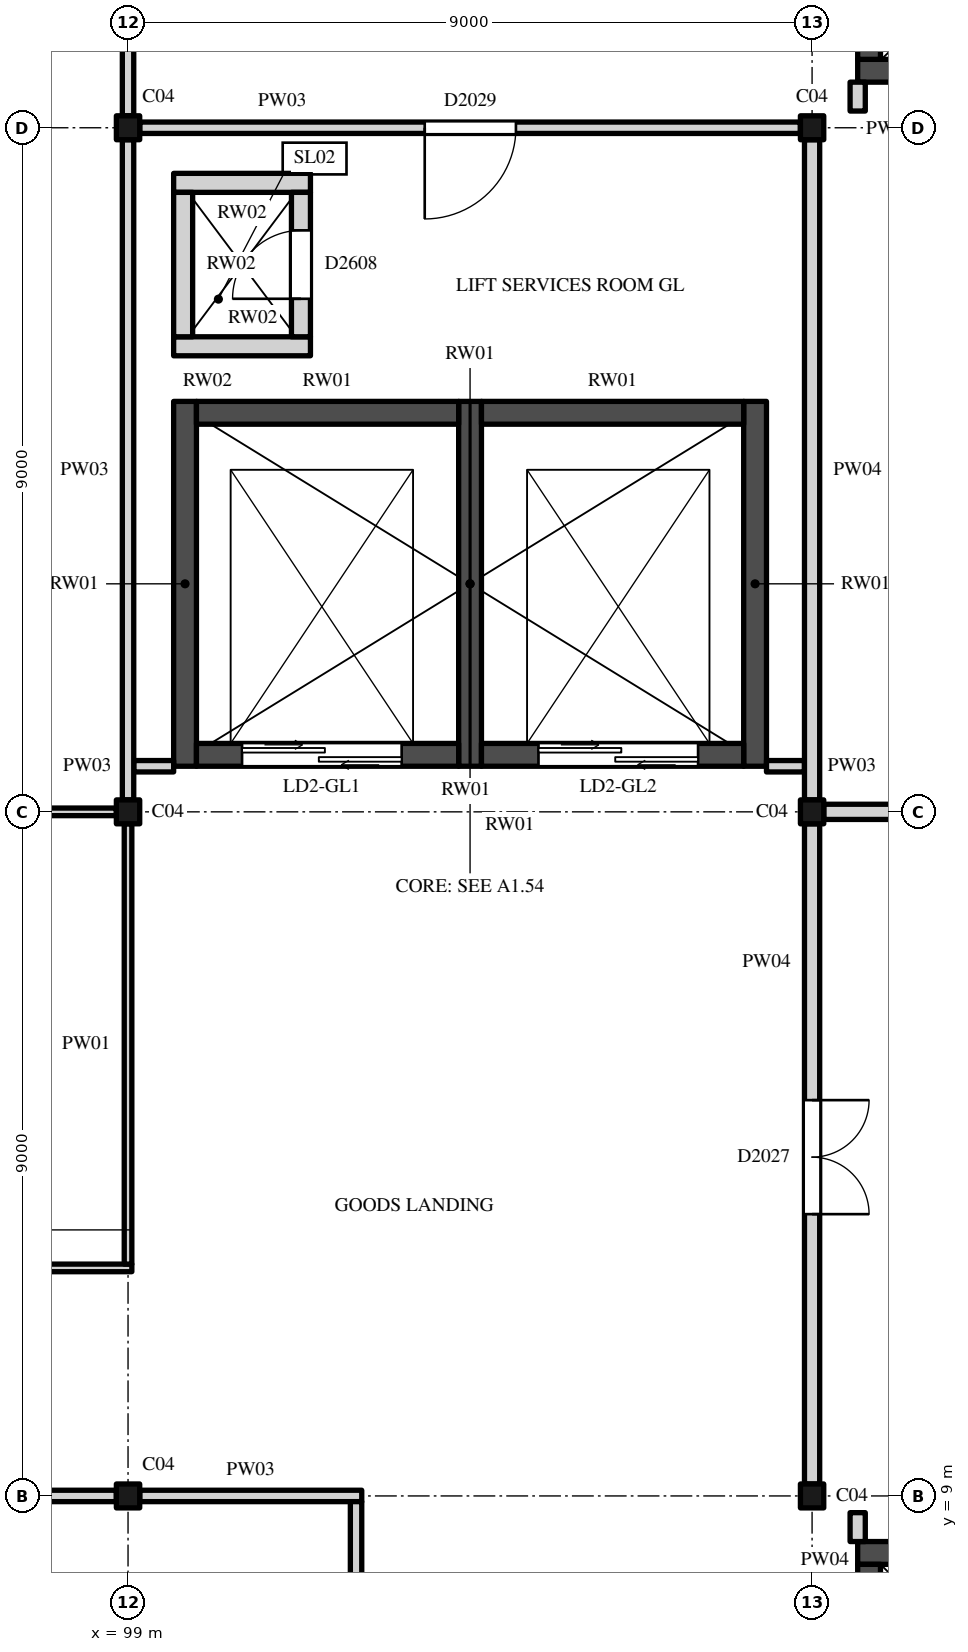
"""IFC4 building model, lengths in metres.
Left out: names, types, materials, properties, quantities, classifications, styles, units other than length and angle.
Written with IfcOpenShell. Run it as: python <this file> out.ifc"""

import sys

from ifc_helpers import new_model, si_unit, direction, frame, frame_2d, origin, origin_2d, place, context, subcontext, project, spatial, rectangle, i_section, extrude, element, fill, save


model = new_model("IFC4")
c1 = context("Model", 3, precision=1e-05, world=origin(), true_north=direction((0.0, 1.0)))
c2 = subcontext(c1, "Body", "Model", "MODEL_VIEW")
j1 = project(units=[si_unit("LENGTHUNIT", "METRE"), si_unit("PLANEANGLEUNIT", "RADIAN")], contexts=[c1])
p1 = place(None, origin())
s1 = spatial("IfcSite", under=j1, at=p1, CompositionType="ELEMENT")
p2 = place(p1, origin())
s2 = spatial("IfcBuilding", under=s1, at=p2, CompositionType="ELEMENT")
p3 = place(p2, frame((0.0, 0.0, 11.0)))
s3 = spatial("IfcBuildingStorey", under=s2, at=p3, CompositionType="ELEMENT", Elevation=11.0)
for number, where, z_axis, x_axis in (
    (1, (99.0, 9.0, 0.0), (0.0, 0.0, 1.0), (1.0, 0.0, 0.0)),
    (2, (108.0, 9.0, 0.0), (0.0, 0.0, 1.0), (1.0, 0.0, 0.0)),
    (3, (99.0, 18.0, 0.0), (0.0, 0.0, 1.0), (1.0, 0.0, 0.0)),
    (4, (108.0, 18.0, 0.0), (0.0, 0.0, 1.0), (1.0, 0.0, 0.0)),
    (5, (99.0, 27.0, 0.0), (0.0, 0.0, 1.0), (1.0, 0.0, 0.0)),
    (6, (108.0, 27.0, 0.0), (0.0, 0.0, 1.0), (1.0, 0.0, 0.0)),
):
    element("IfcColumn", number, at=place(p3, frame(where, z_axis=z_axis, x_axis=x_axis)), inside=s3, PredefinedType="COLUMN", context=c2, shape_type="SweptSolid", body=[
        extrude(i_section(OverallWidth=0.307, OverallDepth=0.315, WebThickness=0.012, FlangeThickness=0.019, FilletRadius=0.017, at=origin_2d()), origin(), (0.0, 0.0, 1.0), 5.0),
    ])
p4 = place(p3, frame((108.6, 8.25, 0.0), z_axis=(0.0, 0.0, 1.0), x_axis=(1.0, 0.0, 0.0)))
e7 = element("IfcWall", 7, at=p4, inside=s3, PredefinedType="SHEAR", context=c2, shape_type="SweptSolid", body=[
    extrude(rectangle(XDim=8.1, YDim=0.3, at=frame_2d((4.05, 0.0))), origin(), (0.0, 0.0, 1.0), 4.825),
])
p5 = place(p3, frame((108.75, 0.3, 0.0), z_axis=(0.0, 0.0, 1.0), x_axis=(0.0, 1.0, 0.0)))
e8 = element("IfcWall", 8, at=p5, inside=s3, PredefinedType="SHEAR", context=c2, shape_type="SweptSolid", body=[
    extrude(rectangle(XDim=7.8, YDim=0.3, at=frame_2d((3.9, 0.0))), origin(), (0.0, 0.0, 1.0), 4.825),
])
p6 = place(p5, frame((3.6, 0.0, 0.0)))
e9 = element("IfcOpeningElement", 9, at=p6, cuts=e8, PredefinedType="OPENING", context=c2, shape_type="SweptSolid", body=[
    extrude(rectangle(XDim=1.2, YDim=2.1, at=frame_2d((0.6, 1.05))), frame((0.0, 0.16, 0.0), z_axis=(0.0, -1.0, 0.0), x_axis=(1.0, 0.0, 0.0)), (0.0, 0.0, 1.0), 0.32),
])
p7 = place(p3, frame((108.6, 27.75, 0.0), z_axis=(0.0, 0.0, 1.0), x_axis=(1.0, 0.0, 0.0)))
e10 = element("IfcWall", 10, at=p7, inside=s3, PredefinedType="SHEAR", context=c2, shape_type="SweptSolid", body=[
    extrude(rectangle(XDim=8.1, YDim=0.3, at=frame_2d((4.05, 0.0))), origin(), (0.0, 0.0, 1.0), 4.825),
])
p8 = place(p3, frame((108.75, 27.9, 0.0), z_axis=(0.0, 0.0, 1.0), x_axis=(0.0, 1.0, 0.0)))
e11 = element("IfcWall", 11, at=p8, inside=s3, PredefinedType="SHEAR", context=c2, shape_type="SweptSolid", body=[
    extrude(rectangle(XDim=7.2, YDim=0.3, at=frame_2d((3.6, 0.0))), origin(), (0.0, 0.0, 1.0), 4.825),
])
p9 = place(p8, frame((3.0, 0.0, 0.0)))
e12 = element("IfcOpeningElement", 12, at=p9, cuts=e11, PredefinedType="OPENING", context=c2, shape_type="SweptSolid", body=[
    extrude(rectangle(XDim=1.2, YDim=2.1, at=frame_2d((0.6, 1.05))), frame((0.0, 0.16, 0.0), z_axis=(0.0, -1.0, 0.0), x_axis=(1.0, 0.0, 0.0)), (0.0, 0.0, 1.0), 0.32),
])
for number, where, z_axis, x_axis in (
    (13, (99.75, 18.6, 0.0), (0.0, 0.0, 1.0), (0.0, 1.0, 0.0)),
    (14, (103.5, 18.6, 0.0), (0.0, 0.0, 1.0), (0.0, 1.0, 0.0)),
    (15, (107.25, 18.6, 0.0), (0.0, 0.0, 1.0), (0.0, 1.0, 0.0)),
):
    element("IfcWall", number, at=place(p3, frame(where, z_axis=z_axis, x_axis=x_axis)), inside=s3, PredefinedType="SHEAR", context=c2, shape_type="SweptSolid", body=[
        extrude(rectangle(XDim=4.8, YDim=0.3, at=frame_2d((2.4, 0.0))), origin(), (0.0, 0.0, 1.0), 4.825),
    ])
p10 = place(p3, frame((99.9, 18.75, 0.0), z_axis=(0.0, 0.0, 1.0), x_axis=(1.0, 0.0, 0.0)))
e16 = element("IfcWall", 16, at=p10, inside=s3, PredefinedType="SHEAR", context=c2, shape_type="SweptSolid", body=[
    extrude(rectangle(XDim=3.45, YDim=0.3, at=frame_2d((1.725, 0.0))), origin(), (0.0, 0.0, 1.0), 4.825),
])
p11 = place(p10, frame((0.6, 0.0, 0.0)))
e17 = element("IfcOpeningElement", 17, at=p11, cuts=e16, PredefinedType="OPENING", context=c2, shape_type="SweptSolid", body=[
    extrude(rectangle(XDim=2.1, YDim=2.4, at=frame_2d((1.05, 1.2))), frame((0.0, 0.16, 0.0), z_axis=(0.0, -1.0, 0.0), x_axis=(1.0, 0.0, 0.0)), (0.0, 0.0, 1.0), 0.32),
])
p12 = place(p3, frame((99.9, 23.25, 0.0), z_axis=(0.0, 0.0, 1.0), x_axis=(1.0, 0.0, 0.0)))
e18 = element("IfcWall", 18, at=p12, inside=s3, PredefinedType="SHEAR", context=c2, shape_type="SweptSolid", body=[
    extrude(rectangle(XDim=3.45, YDim=0.3, at=frame_2d((1.725, 0.0))), origin(), (0.0, 0.0, 1.0), 4.825),
])
p13 = place(p3, frame((103.65, 18.75, 0.0), z_axis=(0.0, 0.0, 1.0), x_axis=(1.0, 0.0, 0.0)))
e19 = element("IfcWall", 19, at=p13, inside=s3, PredefinedType="SHEAR", context=c2, shape_type="SweptSolid", body=[
    extrude(rectangle(XDim=3.45, YDim=0.3, at=frame_2d((1.725, 0.0))), origin(), (0.0, 0.0, 1.0), 4.825),
])
p14 = place(p13, frame((0.75, 0.0, 0.0)))
e20 = element("IfcOpeningElement", 20, at=p14, cuts=e19, PredefinedType="OPENING", context=c2, shape_type="SweptSolid", body=[
    extrude(rectangle(XDim=2.1, YDim=2.4, at=frame_2d((1.05, 1.2))), frame((0.0, 0.16, 0.0), z_axis=(0.0, -1.0, 0.0), x_axis=(1.0, 0.0, 0.0)), (0.0, 0.0, 1.0), 0.32),
])
p15 = place(p3, frame((103.65, 23.25, 0.0), z_axis=(0.0, 0.0, 1.0), x_axis=(1.0, 0.0, 0.0)))
e21 = element("IfcWall", 21, at=p15, inside=s3, PredefinedType="SHEAR", context=c2, shape_type="SweptSolid", body=[
    extrude(rectangle(XDim=3.45, YDim=0.3, at=frame_2d((1.725, 0.0))), origin(), (0.0, 0.0, 1.0), 4.825),
])
for number, where, z_axis, x_axis in (
    (22, (99.6, 24.125, 0.0), (0.0, 0.0, 1.0), (1.0, 0.0, 0.0)),
    (23, (99.6, 26.275, 0.0), (0.0, 0.0, 1.0), (1.0, 0.0, 0.0)),
):
    element("IfcWall", number, at=place(p3, frame(where, z_axis=z_axis, x_axis=x_axis)), inside=s3, PredefinedType="STANDARD", context=c2, shape_type="SweptSolid", body=[
        extrude(rectangle(XDim=1.8, YDim=0.25, at=frame_2d((0.9, 0.0))), origin(), (0.0, 0.0, 1.0), 4.825),
    ])
p16 = place(p3, frame((99.725, 24.25, 0.0), z_axis=(0.0, 0.0, 1.0), x_axis=(0.0, 1.0, 0.0)))
e24 = element("IfcWall", 24, at=p16, inside=s3, PredefinedType="STANDARD", context=c2, shape_type="SweptSolid", body=[
    extrude(rectangle(XDim=1.9, YDim=0.25, at=frame_2d((0.95, 0.0))), origin(), (0.0, 0.0, 1.0), 4.825),
])
p17 = place(p3, frame((101.275, 24.25, 0.0), z_axis=(0.0, 0.0, 1.0), x_axis=(0.0, 1.0, 0.0)))
e25 = element("IfcWall", 25, at=p17, inside=s3, PredefinedType="STANDARD", context=c2, shape_type="SweptSolid", body=[
    extrude(rectangle(XDim=1.9, YDim=0.25, at=frame_2d((0.95, 0.0))), origin(), (0.0, 0.0, 1.0), 4.825),
])
p18 = place(p17, frame((0.5, 0.0, 0.0)))
e26 = element("IfcOpeningElement", 26, at=p18, cuts=e25, PredefinedType="OPENING", context=c2, shape_type="SweptSolid", body=[
    extrude(rectangle(XDim=0.9, YDim=2.1, at=frame_2d((0.45, 1.05))), frame((0.0, 0.135, 0.0), z_axis=(0.0, -1.0, 0.0), x_axis=(1.0, 0.0, 0.0)), (0.0, 0.0, 1.0), 0.27),
])
for number, where, z_axis, x_axis in (
    (27, (100.5, 11.325, 5.0), (0.0, 0.0, 1.0), (1.0, 0.0, 0.0)),
    (28, (100.5, 15.675, 5.0), (0.0, 0.0, 1.0), (1.0, 0.0, 0.0)),
):
    element("IfcWall", number, at=place(p3, frame(where, z_axis=z_axis, x_axis=x_axis)), inside=s3, PredefinedType="PARAPET", context=c2, shape_type="SweptSolid", body=[
        extrude(rectangle(XDim=6.0, YDim=0.15, at=frame_2d((3.0, 0.0))), origin(), (0.0, 0.0, 1.0), 0.5),
    ])
for number, where, z_axis, x_axis in (
    (29, (100.575, 11.4, 5.0), (0.0, 0.0, 1.0), (0.0, 1.0, 0.0)),
    (30, (106.425, 11.4, 5.0), (0.0, 0.0, 1.0), (0.0, 1.0, 0.0)),
):
    element("IfcWall", number, at=place(p3, frame(where, z_axis=z_axis, x_axis=x_axis)), inside=s3, PredefinedType="PARAPET", context=c2, shape_type="SweptSolid", body=[
        extrude(rectangle(XDim=4.2, YDim=0.15, at=frame_2d((2.1, 0.0))), origin(), (0.0, 0.0, 1.0), 0.5),
    ])
for number, where, z_axis, x_axis in (
    (31, (100.5, 20.325, 5.0), (0.0, 0.0, 1.0), (1.0, 0.0, 0.0)),
    (32, (100.5, 24.675, 5.0), (0.0, 0.0, 1.0), (1.0, 0.0, 0.0)),
):
    element("IfcWall", number, at=place(p3, frame(where, z_axis=z_axis, x_axis=x_axis)), inside=s3, PredefinedType="PARAPET", context=c2, shape_type="SweptSolid", body=[
        extrude(rectangle(XDim=6.0, YDim=0.15, at=frame_2d((3.0, 0.0))), origin(), (0.0, 0.0, 1.0), 0.5),
    ])
for number, where, z_axis, x_axis in (
    (33, (100.575, 20.4, 5.0), (0.0, 0.0, 1.0), (0.0, 1.0, 0.0)),
    (34, (106.425, 20.4, 5.0), (0.0, 0.0, 1.0), (0.0, 1.0, 0.0)),
):
    element("IfcWall", number, at=place(p3, frame(where, z_axis=z_axis, x_axis=x_axis)), inside=s3, PredefinedType="PARAPET", context=c2, shape_type="SweptSolid", body=[
        extrude(rectangle(XDim=4.2, YDim=0.15, at=frame_2d((2.1, 0.0))), origin(), (0.0, 0.0, 1.0), 0.5),
    ])
p19 = place(p3, frame((90.154, 9.0, 0.0), z_axis=(0.0, 0.0, 1.0), x_axis=(1.0, 0.0, 0.0)))
e35 = element("IfcWall", 35, at=p19, inside=s3, PredefinedType="PARTITIONING", context=c2, shape_type="SweptSolid", body=[
    extrude(rectangle(XDim=8.693, YDim=0.15, at=frame_2d((4.346, 0.0))), origin(), (0.0, 0.0, 1.0), 4.419),
])
p20 = place(p3, frame((99.154, 9.0, 0.0), z_axis=(0.0, 0.0, 1.0), x_axis=(1.0, 0.0, 0.0)))
e36 = element("IfcWall", 36, at=p20, inside=s3, PredefinedType="PARTITIONING", context=c2, shape_type="SweptSolid", body=[
    extrude(rectangle(XDim=2.921, YDim=0.15, at=frame_2d((1.461, 0.0))), origin(), (0.0, 0.0, 1.0), 4.419),
])
p21 = place(p3, frame((63.1, 12.0, 0.0), z_axis=(0.0, 0.0, 1.0), x_axis=(1.0, 0.0, 0.0)))
e37 = element("IfcWall", 37, at=p21, inside=s3, PredefinedType="PARTITIONING", context=c2, shape_type="SweptSolid", body=[
    extrude(rectangle(XDim=35.95, YDim=0.1, at=frame_2d((17.975, 0.0))), origin(), (0.0, 0.0, 1.0), 4.422),
])
p22 = place(p21, frame((12.75, 0.0, 0.0)))
e38 = element("IfcOpeningElement", 38, at=p22, cuts=e37, PredefinedType="OPENING", context=c2, shape_type="SweptSolid", body=[
    extrude(rectangle(XDim=1.35, YDim=2.4, at=frame_2d((0.675, 1.2))), frame((0.0, 0.06, 0.0), z_axis=(0.0, -1.0, 0.0), x_axis=(1.0, 0.0, 0.0)), (0.0, 0.0, 1.0), 0.12),
])
p23 = place(p21, frame((30.75, 0.0, 0.0)))
e39 = element("IfcOpeningElement", 39, at=p23, cuts=e37, PredefinedType="OPENING", context=c2, shape_type="SweptSolid", body=[
    extrude(rectangle(XDim=1.35, YDim=2.4, at=frame_2d((0.675, 1.2))), frame((0.0, 0.06, 0.0), z_axis=(0.0, -1.0, 0.0), x_axis=(1.0, 0.0, 0.0)), (0.0, 0.0, 1.0), 0.12),
])
p24 = place(p3, frame((90.154, 18.0, 0.0), z_axis=(0.0, 0.0, 1.0), x_axis=(1.0, 0.0, 0.0)))
e40 = element("IfcWall", 40, at=p24, inside=s3, PredefinedType="PARTITIONING", context=c2, shape_type="SweptSolid", body=[
    extrude(rectangle(XDim=8.693, YDim=0.1, at=frame_2d((4.346, 0.0))), origin(), (0.0, 0.0, 1.0), 4.419),
])
p25 = place(p3, frame((108.154, 18.0, 0.0), z_axis=(0.0, 0.0, 1.0), x_axis=(1.0, 0.0, 0.0)))
e41 = element("IfcWall", 41, at=p25, inside=s3, PredefinedType="PARTITIONING", context=c2, shape_type="SweptSolid", body=[
    extrude(rectangle(XDim=8.546, YDim=0.2, at=frame_2d((4.273, 0.0))), origin(), (0.0, 0.0, 1.0), 4.419),
])
p26 = place(p25, frame((3.55, 0.0, 0.0)))
e42 = element("IfcOpeningElement", 42, at=p26, cuts=e41, PredefinedType="OPENING", context=c2, shape_type="SweptSolid", body=[
    extrude(rectangle(XDim=1.5, YDim=2.4, at=frame_2d((0.75, 1.2))), frame((0.0, 0.11, 0.0), z_axis=(0.0, -1.0, 0.0), x_axis=(1.0, 0.0, 0.0)), (0.0, 0.0, 1.0), 0.22),
])
p27 = place(p3, frame((99.075, 18.6, 0.0), z_axis=(0.0, 0.0, 1.0), x_axis=(1.0, 0.0, 0.0)))
e43 = element("IfcWall", 43, at=p27, inside=s3, PredefinedType="PARTITIONING", context=c2, shape_type="SweptSolid", body=[
    extrude(rectangle(XDim=0.525, YDim=0.15, at=frame_2d((0.263, 0.0))), origin(), (0.0, 0.0, 1.0), 4.825),
])
p28 = place(p3, frame((107.4, 18.6, 0.0), z_axis=(0.0, 0.0, 1.0), x_axis=(1.0, 0.0, 0.0)))
e44 = element("IfcWall", 44, at=p28, inside=s3, PredefinedType="PARTITIONING", context=c2, shape_type="SweptSolid", body=[
    extrude(rectangle(XDim=0.5, YDim=0.15, at=frame_2d((0.25, 0.0))), origin(), (0.0, 0.0, 1.0), 4.825),
])
p29 = place(p3, frame((99.154, 27.0, 0.0), z_axis=(0.0, 0.0, 1.0), x_axis=(1.0, 0.0, 0.0)))
e45 = element("IfcWall", 45, at=p29, inside=s3, PredefinedType="PARTITIONING", context=c2, shape_type="SweptSolid", body=[
    extrude(rectangle(XDim=8.693, YDim=0.15, at=frame_2d((4.346, 0.0))), origin(), (0.0, 0.0, 1.0), 4.419),
])
p30 = place(p29, frame((3.75, 0.0, 0.0)))
e46 = element("IfcOpeningElement", 46, at=p30, cuts=e45, PredefinedType="OPENING", context=c2, shape_type="SweptSolid", body=[
    extrude(rectangle(XDim=1.2, YDim=2.4, at=frame_2d((0.6, 1.2))), frame((0.0, 0.085, 0.0), z_axis=(0.0, -1.0, 0.0), x_axis=(1.0, 0.0, 0.0)), (0.0, 0.0, 1.0), 0.17),
])
p31 = place(p3, frame((99.0, 12.05, 0.0), z_axis=(0.0, 0.0, 1.0), x_axis=(0.0, 1.0, 0.0)))
e47 = element("IfcWall", 47, at=p31, inside=s3, PredefinedType="PARTITIONING", context=c2, shape_type="SweptSolid", body=[
    extrude(rectangle(XDim=5.793, YDim=0.1, at=frame_2d((2.896, 0.0))), origin(), (0.0, 0.0, 1.0), 4.297),
])
p32 = place(p3, frame((99.0, 18.157, 0.0), z_axis=(0.0, 0.0, 1.0), x_axis=(0.0, 1.0, 0.0)))
e48 = element("IfcWall", 48, at=p32, inside=s3, PredefinedType="PARTITIONING", context=c2, shape_type="SweptSolid", body=[
    extrude(rectangle(XDim=8.686, YDim=0.15, at=frame_2d((4.343, 0.0))), origin(), (0.0, 0.0, 1.0), 4.297),
])
p33 = place(p3, frame((99.0, 27.157, 0.0), z_axis=(0.0, 0.0, 1.0), x_axis=(0.0, 1.0, 0.0)))
e49 = element("IfcWall", 49, at=p33, inside=s3, PredefinedType="PARTITIONING", context=c2, shape_type="SweptSolid", body=[
    extrude(rectangle(XDim=2.768, YDim=0.15, at=frame_2d((1.384, 0.0))), origin(), (0.0, 0.0, 1.0), 4.297),
])
p34 = place(p3, frame((102.0, 0.3, 0.0), z_axis=(0.0, 0.0, 1.0), x_axis=(0.0, 1.0, 0.0)))
e50 = element("IfcWall", 50, at=p34, inside=s3, PredefinedType="PARTITIONING", context=c2, shape_type="SweptSolid", body=[
    extrude(rectangle(XDim=8.625, YDim=0.15, at=frame_2d((4.312, 0.0))), origin(), (0.0, 0.0, 1.0), 4.825),
])
p35 = place(p3, frame((108.0, 9.157, 0.0), z_axis=(0.0, 0.0, 1.0), x_axis=(0.0, 1.0, 0.0)))
e51 = element("IfcWall", 51, at=p35, inside=s3, PredefinedType="PARTITIONING", context=c2, shape_type="SweptSolid", body=[
    extrude(rectangle(XDim=8.686, YDim=0.2, at=frame_2d((4.343, 0.0))), origin(), (0.0, 0.0, 1.0), 4.297),
])
p36 = place(p35, frame((3.55, 0.0, 0.0)))
e52 = element("IfcOpeningElement", 52, at=p36, cuts=e51, PredefinedType="OPENING", context=c2, shape_type="SweptSolid", body=[
    extrude(rectangle(XDim=1.5, YDim=2.4, at=frame_2d((0.75, 1.2))), frame((0.0, 0.11, 0.0), z_axis=(0.0, -1.0, 0.0), x_axis=(1.0, 0.0, 0.0)), (0.0, 0.0, 1.0), 0.22),
])
p37 = place(p3, frame((108.0, 18.157, 0.0), z_axis=(0.0, 0.0, 1.0), x_axis=(0.0, 1.0, 0.0)))
e53 = element("IfcWall", 53, at=p37, inside=s3, PredefinedType="PARTITIONING", context=c2, shape_type="SweptSolid", body=[
    extrude(rectangle(XDim=8.686, YDim=0.2, at=frame_2d((4.343, 0.0))), origin(), (0.0, 0.0, 1.0), 4.297),
])
for number, where, z_axis, x_axis in (
    (54, (108.6, 8.4, 0.0), (0.0, 0.0, 1.0), (0.0, 1.0, 0.0)),
    (55, (108.6, 27.22, 0.0), (0.0, 0.0, 1.0), (0.0, 1.0, 0.0)),
):
    element("IfcWall", number, at=place(p3, frame(where, z_axis=z_axis, x_axis=x_axis)), inside=s3, PredefinedType="PARTITIONING", context=c2, shape_type="SweptSolid", body=[
        extrude(rectangle(XDim=0.38, YDim=0.2, at=frame_2d((0.19, 0.0))), origin(), (0.0, 0.0, 1.0), 4.825),
    ])
p38 = place(p11, origin())
e56 = element("IfcDoor", 56, at=p38, inside=s3, OperationType="DOUBLE_DOOR_SLIDING", PredefinedType="DOOR", context=c2, shape_type="SweptSolid", body=[
    extrude(rectangle(XDim=2.1, YDim=2.4, at=frame_2d((1.05, 1.2))), frame((0.0, 0.025, 0.0), z_axis=(0.0, -1.0, 0.0), x_axis=(1.0, 0.0, 0.0)), (0.0, 0.0, 1.0), 0.05),
])
fill(e17, e56)
p39 = place(p14, origin())
e57 = element("IfcDoor", 57, at=p39, inside=s3, OperationType="DOUBLE_DOOR_SLIDING", PredefinedType="DOOR", context=c2, shape_type="SweptSolid", body=[
    extrude(rectangle(XDim=2.1, YDim=2.4, at=frame_2d((1.05, 1.2))), frame((0.0, 0.025, 0.0), z_axis=(0.0, -1.0, 0.0), x_axis=(1.0, 0.0, 0.0)), (0.0, 0.0, 1.0), 0.05),
])
fill(e20, e57)
p40 = place(p18, origin())
e58 = element("IfcDoor", 58, at=p40, inside=s3, OperationType="SINGLE_SWING_RIGHT", PredefinedType="DOOR", context=c2, shape_type="SweptSolid", body=[
    extrude(rectangle(XDim=0.9, YDim=2.1, at=frame_2d((0.45, 1.05))), frame((0.0, 0.025, 0.0), z_axis=(0.0, -1.0, 0.0), x_axis=(1.0, 0.0, 0.0)), (0.0, 0.0, 1.0), 0.05),
])
fill(e26, e58)
p41 = place(p36, origin())
e59 = element("IfcDoor", 59, at=p41, inside=s3, OperationType="DOUBLE_DOOR_SINGLE_SWING", PredefinedType="DOOR", context=c2, shape_type="SweptSolid", body=[
    extrude(rectangle(XDim=1.5, YDim=2.4, at=frame_2d((0.75, 1.2))), frame((0.0, 0.025, 0.0), z_axis=(0.0, -1.0, 0.0), x_axis=(1.0, 0.0, 0.0)), (0.0, 0.0, 1.0), 0.05),
])
fill(e52, e59)
p42 = place(p30, origin())
e60 = element("IfcDoor", 60, at=p42, inside=s3, OperationType="SINGLE_SWING_LEFT", PredefinedType="DOOR", context=c2, shape_type="SweptSolid", body=[
    extrude(rectangle(XDim=1.2, YDim=2.4, at=frame_2d((0.6, 1.2))), frame((0.0, 0.025, 0.0), z_axis=(0.0, -1.0, 0.0), x_axis=(1.0, 0.0, 0.0)), (0.0, 0.0, 1.0), 0.05),
])
fill(e46, e60)
save(model, sys.argv[1])
